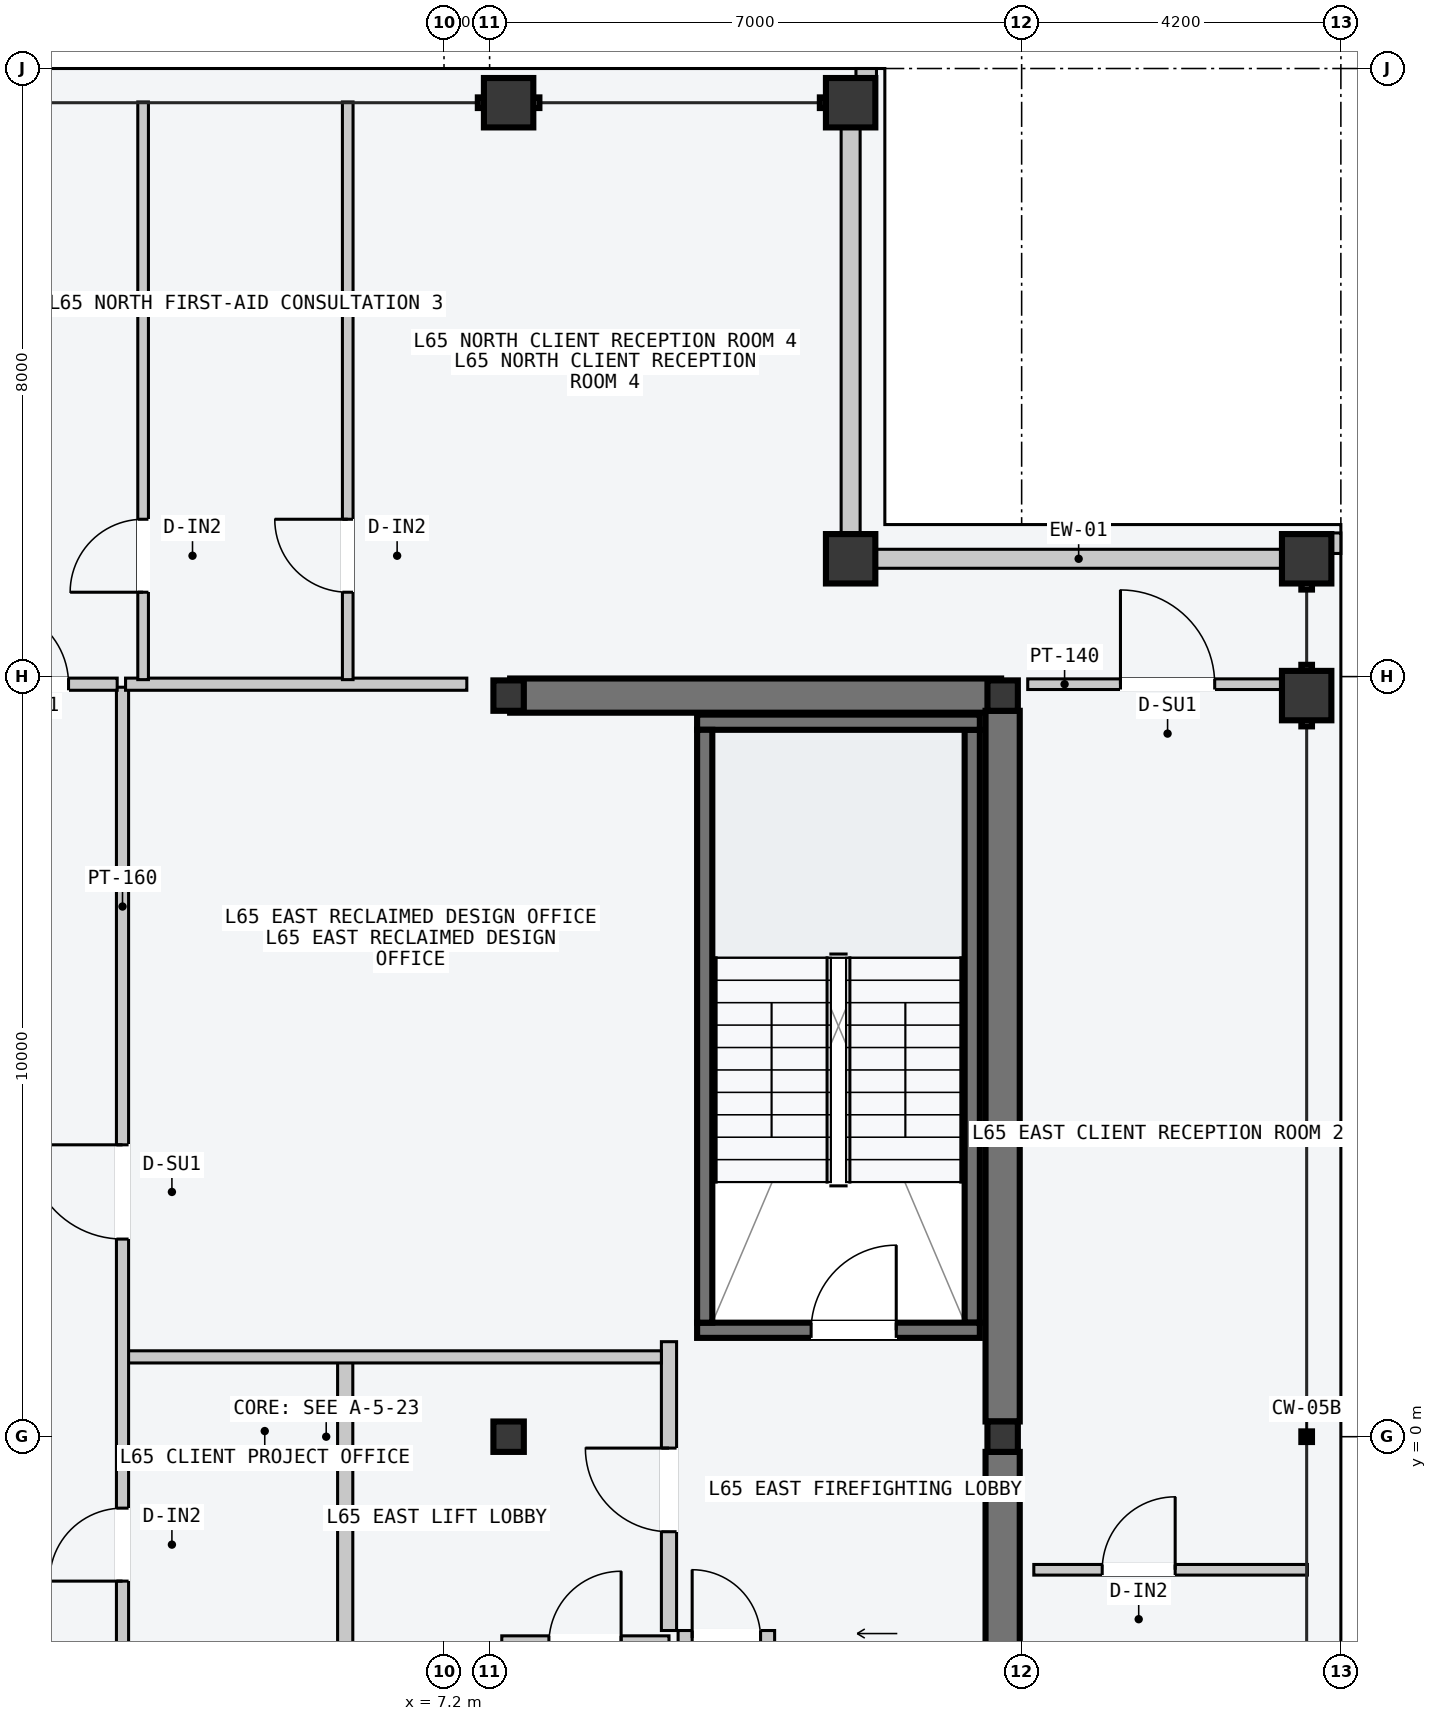
"""IFC4 building model, lengths in metres.
Left out: names, types, materials, properties, quantities, classifications, styles, units other than length and angle.
Written with IfcOpenShell. Run it as: python <this file> out.ifc"""

import sys

from ifc_helpers import new_model, si_unit, direction, frame, frame_2d, origin, origin_2d, place, context, subcontext, project, spatial, rectangle, hollow_rectangle, i_section, extrude, element, fill, save


model = new_model("IFC4")
c1 = context("Model", 3, precision=1e-05, world=origin(), true_north=direction((0.0, 1.0)))
c2 = subcontext(c1, "Body", "Model", "MODEL_VIEW")
j1 = project(units=[si_unit("LENGTHUNIT", "METRE"), si_unit("PLANEANGLEUNIT", "RADIAN")], contexts=[c1])
p1 = place(None, origin())
s1 = spatial("IfcSite", under=j1, at=p1, CompositionType="ELEMENT")
p2 = place(p1, origin())
s2 = spatial("IfcBuilding", under=s1, at=p2, CompositionType="ELEMENT")
p3 = place(p2, frame((0.0, 0.0, 247.2)))
s3 = spatial("IfcBuildingStorey", under=s2, at=p3, CompositionType="ELEMENT", Elevation=247.2)
p4 = place(p3, frame((8.07, 9.75, -0.2), z_axis=(0.0, 0.0, 1.0), x_axis=(1.0, 0.0, 0.0)))
e1 = element("IfcWall", 1, at=p4, inside=s3, PredefinedType="SHEAR", context=c2, shape_type="SweptSolid", body=[
    extrude(rectangle(XDim=6.46, YDim=0.45, at=frame_2d((3.23, 0.0))), origin(), (0.0, 0.0, 1.0), 3.6),
])
for number, where, z_axis, x_axis in (
    (2, (14.55, -9.55, -0.2), (0.0, 0.0, 1.0), (0.0, 1.0, 0.0)),
    (3, (14.55, 0.2, -0.2), (0.0, 0.0, 1.0), (0.0, 1.0, 0.0)),
):
    element("IfcWall", number, at=place(p3, frame(where, z_axis=z_axis, x_axis=x_axis)), inside=s3, PredefinedType="SHEAR", context=c2, shape_type="SweptSolid", body=[
        extrude(rectangle(XDim=9.35, YDim=0.45, at=frame_2d((4.675, 0.0))), origin(), (0.0, 0.0, 1.0), 3.6),
    ])
p5 = place(p3, frame((14.15, 1.5, -0.2), z_axis=(0.0, 0.0, 1.0), x_axis=(0.0, 1.0, 0.0)))
e4 = element("IfcWall", 4, at=p5, inside=s3, PredefinedType="SOLIDWALL", context=c2, shape_type="SweptSolid", body=[
    extrude(rectangle(XDim=7.8, YDim=0.2, at=frame_2d((3.9, 0.0))), origin(), (0.0, 0.0, 1.0), 3.6),
])
p6 = place(p3, frame((10.53, 1.4, -0.2), z_axis=(0.0, 0.0, 1.0), x_axis=(1.0, 0.0, 0.0)))
e5 = element("IfcWall", 5, at=p6, inside=s3, PredefinedType="SOLIDWALL", context=c2, shape_type="SweptSolid", body=[
    extrude(rectangle(XDim=3.72, YDim=0.2, at=frame_2d((1.86, 0.0))), origin(), (0.0, 0.0, 1.0), 3.6),
])
p7 = place(p6, frame((1.5, 0.0, 0.2)))
e6 = element("IfcOpeningElement", 6, at=p7, cuts=e5, PredefinedType="OPENING", context=c2, shape_type="SweptSolid", body=[
    extrude(rectangle(XDim=1.12, YDim=2.18, at=frame_2d((0.56, 1.09))), frame((0.0, 0.11, 0.0), z_axis=(0.0, -1.0, 0.0), x_axis=(1.0, 0.0, 0.0)), (0.0, 0.0, 1.0), 0.22),
])
p8 = place(p3, frame((10.53, 9.4, -0.2), z_axis=(0.0, 0.0, 1.0), x_axis=(1.0, 0.0, 0.0)))
e7 = element("IfcWall", 7, at=p8, inside=s3, PredefinedType="SOLIDWALL", context=c2, shape_type="SweptSolid", body=[
    extrude(rectangle(XDim=3.72, YDim=0.2, at=frame_2d((1.86, 0.0))), origin(), (0.0, 0.0, 1.0), 3.6),
])
p9 = place(p3, frame((10.63, 1.5, -0.2), z_axis=(0.0, 0.0, 1.0), x_axis=(0.0, 1.0, 0.0)))
e8 = element("IfcWall", 8, at=p9, inside=s3, PredefinedType="SOLIDWALL", context=c2, shape_type="SweptSolid", body=[
    extrude(rectangle(XDim=7.8, YDim=0.2, at=frame_2d((3.9, 0.0))), origin(), (0.0, 0.0, 1.0), 3.6),
])
for number, where, z_axis, x_axis in (
    (9, (8.05, 0.0, 0.0), (0.0, 0.0, 1.0), (1.0, 0.0, 0.0)),
    (10, (8.05, 9.75, 0.0), (0.0, 0.0, 1.0), (1.0, 0.0, 0.0)),
    (11, (14.55, 0.0, 0.0), (0.0, 0.0, 1.0), (1.0, 0.0, 0.0)),
    (12, (14.55, 9.75, 0.0), (0.0, 0.0, 1.0), (1.0, 0.0, 0.0)),
):
    element("IfcColumn", number, at=place(p3, frame(where, z_axis=z_axis, x_axis=x_axis)), inside=s3, PredefinedType="COLUMN", context=c2, shape_type="SweptSolid", body=[
        extrude(i_section(OverallWidth=0.4, OverallDepth=0.4, WebThickness=0.013, FlangeThickness=0.021, at=origin_2d()), origin(), (0.0, 0.0, 1.0), 3.6),
    ])
for number, where, z_axis, x_axis in (
    (13, (8.05, 17.55, 0.0), (0.0, 0.0, 1.0), (1.0, 0.0, 0.0)),
    (14, (12.55, 17.55, 0.0), (0.0, 0.0, 1.0), (1.0, 0.0, 0.0)),
    (15, (18.55, 9.75, 0.0), (0.0, 0.0, 1.0), (0.0, 1.0, 0.0)),
    (16, (18.55, 11.55, 0.0), (0.0, 0.0, 1.0), (0.0, 1.0, 0.0)),
    (17, (12.55, 11.55, 0.0), (0.0, 0.0, 1.0), (1.0, 0.0, 0.0)),
):
    element("IfcColumn", number, at=place(p3, frame(where, z_axis=z_axis, x_axis=x_axis)), inside=s3, PredefinedType="COLUMN", context=c2, shape_type="SweptSolid", body=[
        extrude(hollow_rectangle(XDim=0.65, YDim=0.65, WallThickness=0.028, at=origin_2d()), origin(), (0.0, 0.0, 1.0), 3.6),
    ])
for number, where, z_axis, x_axis in (
    (18, (12.885, 11.55, 0.0), (0.0, 0.0, 1.0), (1.0, 0.0, 0.0)),
    (19, (12.55, 11.885, 0.0), (0.0, 0.0, 1.0), (0.0, 1.0, 0.0)),
):
    element("IfcWall", number, at=place(p3, frame(where, z_axis=z_axis, x_axis=x_axis)), inside=s3, PredefinedType="STANDARD", context=c2, shape_type="SweptSolid", body=[
        extrude(rectangle(XDim=5.33, YDim=0.25, at=frame_2d((2.665, 0.0))), origin(), (0.0, 0.0, 1.0), 2.85),
    ])
for number, where, z_axis, x_axis in (
    (20, (12.62, 17.89, 0.0), (0.0, 0.0, 1.0), (1.0, 0.0, 0.0)),
    (21, (18.89, 11.62, 0.0), (0.0, 0.0, 1.0), (0.0, 1.0, 0.0)),
):
    element("IfcWall", number, at=place(p3, frame(where, z_axis=z_axis, x_axis=x_axis)), inside=s3, PredefinedType="PARAPET", context=c2, shape_type="SweptSolid", body=[
        extrude(rectangle(XDim=0.27, YDim=0.22, at=frame_2d((0.135, 0.0))), origin(), (0.0, 0.0, 1.0), 1.2),
    ])
p10 = place(p3, frame((5.9, -9.45, 0.0), z_axis=(0.0, 0.0, 1.0), x_axis=(0.0, 1.0, 0.0)))
e22 = element("IfcWall", 22, at=p10, inside=s3, PredefinedType="PARTITIONING", context=c2, shape_type="SweptSolid", body=[
    extrude(rectangle(XDim=10.5, YDim=0.2, at=frame_2d((5.25, 0.0))), origin(), (0.0, 0.0, 1.0), 3.4),
])
p11 = place(p10, frame((3.9, 0.0, 0.0)))
e23 = element("IfcOpeningElement", 23, at=p11, cuts=e22, PredefinedType="OPENING", context=c2, shape_type="SweptSolid", body=[
    extrude(rectangle(XDim=1.5, YDim=2.2, at=frame_2d((0.75, 1.1))), frame((0.0, 0.11, 0.0), z_axis=(0.0, -1.0, 0.0), x_axis=(1.0, 0.0, 0.0)), (0.0, 0.0, 1.0), 0.22),
])
p12 = place(p3, frame((10.16, -2.55, 0.0), z_axis=(0.0, 0.0, 1.0), x_axis=(0.0, 1.0, 0.0)))
e24 = element("IfcWall", 24, at=p12, inside=s3, PredefinedType="PARTITIONING", context=c2, shape_type="SweptSolid", body=[
    extrude(rectangle(XDim=3.8, YDim=0.2, at=frame_2d((1.9, 0.0))), origin(), (0.0, 0.0, 1.0), 3.4),
])
p13 = place(p12, frame((1.3, 0.0, 0.0)))
e25 = element("IfcOpeningElement", 25, at=p13, cuts=e24, PredefinedType="OPENING", context=c2, shape_type="SweptSolid", body=[
    extrude(rectangle(XDim=1.1, YDim=2.15, at=frame_2d((0.55, 1.075))), frame((0.0, 0.11, 0.0), z_axis=(0.0, -1.0, 0.0), x_axis=(1.0, 0.0, 0.0)), (0.0, 0.0, 1.0), 0.22),
])
p14 = place(p3, frame((10.28, -2.65, 0.0), z_axis=(0.0, 0.0, 1.0), x_axis=(1.0, 0.0, 0.0)))
e26 = element("IfcWall", 26, at=p14, inside=s3, PredefinedType="PARTITIONING", context=c2, shape_type="SweptSolid", body=[
    extrude(rectangle(XDim=1.27, YDim=0.2, at=frame_2d((0.635, 0.0))), origin(), (0.0, 0.0, 1.0), 3.4),
])
p15 = place(p14, frame((0.185, 0.0, 0.0)))
e27 = element("IfcOpeningElement", 27, at=p15, cuts=e26, PredefinedType="OPENING", context=c2, shape_type="SweptSolid", body=[
    extrude(rectangle(XDim=0.9, YDim=2.15, at=frame_2d((0.45, 1.075))), frame((0.0, 0.11, 0.0), z_axis=(0.0, -1.0, 0.0), x_axis=(1.0, 0.0, 0.0)), (0.0, 0.0, 1.0), 0.22),
])
p16 = place(p3, frame((7.96, -2.72, 0.0), z_axis=(0.0, 0.0, 1.0), x_axis=(1.0, 0.0, 0.0)))
e28 = element("IfcWall", 28, at=p16, inside=s3, PredefinedType="PARTITIONING", context=c2, shape_type="SweptSolid", body=[
    extrude(rectangle(XDim=2.2, YDim=0.2, at=frame_2d((1.1, 0.0))), origin(), (0.0, 0.0, 1.0), 3.4),
])
p17 = place(p16, frame((0.62, 0.0, 0.0)))
e29 = element("IfcOpeningElement", 29, at=p17, cuts=e28, PredefinedType="OPENING", context=c2, shape_type="SweptSolid", body=[
    extrude(rectangle(XDim=0.95, YDim=2.1, at=frame_2d((0.475, 1.05))), frame((0.0, 0.11, 0.0), z_axis=(0.0, -1.0, 0.0), x_axis=(1.0, 0.0, 0.0)), (0.0, 0.0, 1.0), 0.22),
])
p18 = place(p3, frame((3.01, 1.05, 0.0), z_axis=(0.0, 0.0, 1.0), x_axis=(1.0, 0.0, 0.0)))
e30 = element("IfcWall", 30, at=p18, inside=s3, PredefinedType="PARTITIONING", context=c2, shape_type="SweptSolid", body=[
    extrude(rectangle(XDim=7.05, YDim=0.16, at=frame_2d((3.525, 0.0))), origin(), (0.0, 0.0, 1.0), 3.4),
])
p19 = place(p3, frame((2.97, -3.5, 0.0), z_axis=(0.0, 0.0, 1.0), x_axis=(0.0, 1.0, 0.0)))
e31 = element("IfcWall", 31, at=p19, inside=s3, PredefinedType="PARTITIONING", context=c2, shape_type="SweptSolid", body=[
    extrude(rectangle(XDim=13.36, YDim=0.16, at=frame_2d((6.68, 0.0))), origin(), (0.0, 0.0, 1.0), 3.4),
])
p20 = place(p19, frame((6.1, 0.0, 0.0)))
e32 = element("IfcOpeningElement", 32, at=p20, cuts=e31, PredefinedType="OPENING", context=c2, shape_type="SweptSolid", body=[
    extrude(rectangle(XDim=1.24, YDim=2.24, at=frame_2d((0.62, 1.12))), frame((0.0, 0.09, 0.0), z_axis=(0.0, -1.0, 0.0), x_axis=(1.0, 0.0, 0.0)), (0.0, 0.0, 1.0), 0.18),
])
p21 = place(p19, frame((1.6, 0.0, 0.0)))
e33 = element("IfcOpeningElement", 33, at=p21, cuts=e31, PredefinedType="OPENING", context=c2, shape_type="SweptSolid", body=[
    extrude(rectangle(XDim=0.96, YDim=2.18, at=frame_2d((0.48, 1.09))), frame((0.0, 0.09, 0.0), z_axis=(0.0, -1.0, 0.0), x_axis=(1.0, 0.0, 0.0)), (0.0, 0.0, 1.0), 0.18),
])
p22 = place(p3, frame((3.01, 9.9, 0.0), z_axis=(0.0, 0.0, 1.0), x_axis=(1.0, 0.0, 0.0)))
e34 = element("IfcWall", 34, at=p22, inside=s3, PredefinedType="PARTITIONING", context=c2, shape_type="SweptSolid", body=[
    extrude(rectangle(XDim=4.49, YDim=0.16, at=frame_2d((2.245, 0.0))), origin(), (0.0, 0.0, 1.0), 3.4),
])
p23 = place(p3, frame((3.241, 9.96, 0.0), z_axis=(0.0, 0.0, 1.0), x_axis=(0.0, 1.0, 0.0)))
e35 = element("IfcWall", 35, at=p23, inside=s3, PredefinedType="PARTITIONING", context=c2, shape_type="SweptSolid", body=[
    extrude(rectangle(XDim=7.6, YDim=0.14, at=frame_2d((3.8, 0.0))), origin(), (0.0, 0.0, 1.0), 3.4),
])
p24 = place(p23, frame((1.15, 0.0, 0.0)))
e36 = element("IfcOpeningElement", 36, at=p24, cuts=e35, PredefinedType="OPENING", context=c2, shape_type="SweptSolid", body=[
    extrude(rectangle(XDim=0.96, YDim=2.18, at=frame_2d((0.48, 1.09))), frame((0.0, 0.08, 0.0), z_axis=(0.0, -1.0, 0.0), x_axis=(1.0, 0.0, 0.0)), (0.0, 0.0, 1.0), 0.16),
])
p25 = place(p3, frame((5.933, 9.96, 0.0), z_axis=(0.0, 0.0, 1.0), x_axis=(0.0, 1.0, 0.0)))
e37 = element("IfcWall", 37, at=p25, inside=s3, PredefinedType="PARTITIONING", context=c2, shape_type="SweptSolid", body=[
    extrude(rectangle(XDim=7.6, YDim=0.14, at=frame_2d((3.8, 0.0))), origin(), (0.0, 0.0, 1.0), 3.4),
])
p26 = place(p25, frame((1.15, 0.0, 0.0)))
e38 = element("IfcOpeningElement", 38, at=p26, cuts=e37, PredefinedType="OPENING", context=c2, shape_type="SweptSolid", body=[
    extrude(rectangle(XDim=0.96, YDim=2.18, at=frame_2d((0.48, 1.09))), frame((0.0, 0.08, 0.0), z_axis=(0.0, -1.0, 0.0), x_axis=(1.0, 0.0, 0.0)), (0.0, 0.0, 1.0), 0.16),
])
p27 = place(p3, frame((0.6, 9.9, 0.0), z_axis=(0.0, 0.0, 1.0), x_axis=(1.0, 0.0, 0.0)))
e39 = element("IfcWall", 39, at=p27, inside=s3, PredefinedType="PARTITIONING", context=c2, shape_type="SweptSolid", body=[
    extrude(rectangle(XDim=2.3, YDim=0.16, at=frame_2d((1.15, 0.0))), origin(), (0.0, 0.0, 1.0), 3.4),
])
p28 = place(p27, frame((0.64, 0.0, 0.0)))
e40 = element("IfcOpeningElement", 40, at=p28, cuts=e39, PredefinedType="OPENING", context=c2, shape_type="SweptSolid", body=[
    extrude(rectangle(XDim=1.02, YDim=2.2, at=frame_2d((0.51, 1.1))), frame((0.0, 0.09, 0.0), z_axis=(0.0, -1.0, 0.0), x_axis=(1.0, 0.0, 0.0)), (0.0, 0.0, 1.0), 0.18),
])
p29 = place(p3, frame((14.88, 9.9, 0.0), z_axis=(0.0, 0.0, 1.0), x_axis=(1.0, 0.0, 0.0)))
e41 = element("IfcWall", 41, at=p29, inside=s3, PredefinedType="PARTITIONING", context=c2, shape_type="SweptSolid", body=[
    extrude(rectangle(XDim=3.68, YDim=0.14, at=frame_2d((1.84, 0.0))), origin(), (0.0, 0.0, 1.0), 3.4),
])
p30 = place(p29, frame((1.22, 0.0, 0.0)))
e42 = element("IfcOpeningElement", 42, at=p30, cuts=e41, PredefinedType="OPENING", context=c2, shape_type="SweptSolid", body=[
    extrude(rectangle(XDim=1.24, YDim=2.24, at=frame_2d((0.62, 1.12))), frame((0.0, 0.08, 0.0), z_axis=(0.0, -1.0, 0.0), x_axis=(1.0, 0.0, 0.0)), (0.0, 0.0, 1.0), 0.16),
])
p31 = place(p3, frame((14.96, -1.751, 0.0), z_axis=(0.0, 0.0, 1.0), x_axis=(1.0, 0.0, 0.0)))
e43 = element("IfcWall", 43, at=p31, inside=s3, PredefinedType="PARTITIONING", context=c2, shape_type="SweptSolid", body=[
    extrude(rectangle(XDim=3.6, YDim=0.14, at=frame_2d((1.8, 0.0))), origin(), (0.0, 0.0, 1.0), 3.4),
])
p32 = place(p31, frame((0.9, 0.0, 0.0)))
e44 = element("IfcOpeningElement", 44, at=p32, cuts=e43, PredefinedType="OPENING", context=c2, shape_type="SweptSolid", body=[
    extrude(rectangle(XDim=0.96, YDim=2.18, at=frame_2d((0.48, 1.09))), frame((0.0, 0.08, 0.0), z_axis=(0.0, -1.0, 0.0), x_axis=(1.0, 0.0, 0.0)), (0.0, 0.0, 1.0), 0.16),
])
p33 = place(p7, origin())
e45 = element("IfcDoor", 45, at=p33, inside=s3, OperationType="SINGLE_SWING_RIGHT", PredefinedType="DOOR", context=c2, shape_type="SweptSolid", body=[
    extrude(rectangle(XDim=1.12, YDim=2.18, at=frame_2d((0.56, 1.09))), frame((0.0, 0.025, 0.0), z_axis=(0.0, -1.0, 0.0), x_axis=(1.0, 0.0, 0.0)), (0.0, 0.0, 1.0), 0.05),
])
fill(e6, e45)
p34 = place(p13, origin())
e46 = element("IfcDoor", 46, at=p34, inside=s3, OperationType="SINGLE_SWING_RIGHT", PredefinedType="DOOR", context=c2, shape_type="SweptSolid", body=[
    extrude(rectangle(XDim=1.1, YDim=2.15, at=frame_2d((0.55, 1.075))), frame((0.0, 0.025, 0.0), z_axis=(0.0, -1.0, 0.0), x_axis=(1.0, 0.0, 0.0)), (0.0, 0.0, 1.0), 0.05),
])
fill(e25, e46)
p35 = place(p15, origin())
e47 = element("IfcDoor", 47, at=p35, inside=s3, OperationType="SINGLE_SWING_LEFT", PredefinedType="DOOR", context=c2, shape_type="SweptSolid", body=[
    extrude(rectangle(XDim=0.9, YDim=2.15, at=frame_2d((0.45, 1.075))), frame((0.0, 0.025, 0.0), z_axis=(0.0, -1.0, 0.0), x_axis=(1.0, 0.0, 0.0)), (0.0, 0.0, 1.0), 0.05),
])
fill(e27, e47)
p36 = place(p20, origin())
e48 = element("IfcDoor", 48, at=p36, inside=s3, OperationType="SINGLE_SWING_RIGHT", PredefinedType="DOOR", context=c2, shape_type="SweptSolid", body=[
    extrude(rectangle(XDim=1.24, YDim=2.24, at=frame_2d((0.62, 1.12))), frame((0.0, 0.025, 0.0), z_axis=(0.0, -1.0, 0.0), x_axis=(1.0, 0.0, 0.0)), (0.0, 0.0, 1.0), 0.05),
])
fill(e32, e48)
p37 = place(p21, origin())
e49 = element("IfcDoor", 49, at=p37, inside=s3, OperationType="SINGLE_SWING_LEFT", PredefinedType="DOOR", context=c2, shape_type="SweptSolid", body=[
    extrude(rectangle(XDim=0.96, YDim=2.18, at=frame_2d((0.48, 1.09))), frame((0.0, 0.025, 0.0), z_axis=(0.0, -1.0, 0.0), x_axis=(1.0, 0.0, 0.0)), (0.0, 0.0, 1.0), 0.05),
])
fill(e33, e49)
p38 = place(p24, origin())
e50 = element("IfcDoor", 50, at=p38, inside=s3, OperationType="SINGLE_SWING_LEFT", PredefinedType="DOOR", context=c2, shape_type="SweptSolid", body=[
    extrude(rectangle(XDim=0.96, YDim=2.18, at=frame_2d((0.48, 1.09))), frame((0.0, 0.025, 0.0), z_axis=(0.0, -1.0, 0.0), x_axis=(1.0, 0.0, 0.0)), (0.0, 0.0, 1.0), 0.05),
])
fill(e36, e50)
p39 = place(p26, origin())
e51 = element("IfcDoor", 51, at=p39, inside=s3, OperationType="SINGLE_SWING_RIGHT", PredefinedType="DOOR", context=c2, shape_type="SweptSolid", body=[
    extrude(rectangle(XDim=0.96, YDim=2.18, at=frame_2d((0.48, 1.09))), frame((0.0, 0.025, 0.0), z_axis=(0.0, -1.0, 0.0), x_axis=(1.0, 0.0, 0.0)), (0.0, 0.0, 1.0), 0.05),
])
fill(e38, e51)
p40 = place(p28, origin())
e52 = element("IfcDoor", 52, at=p40, inside=s3, OperationType="SINGLE_SWING_LEFT", PredefinedType="DOOR", context=c2, shape_type="SweptSolid", body=[
    extrude(rectangle(XDim=1.02, YDim=2.2, at=frame_2d((0.51, 1.1))), frame((0.0, 0.025, 0.0), z_axis=(0.0, -1.0, 0.0), x_axis=(1.0, 0.0, 0.0)), (0.0, 0.0, 1.0), 0.05),
])
fill(e40, e52)
p41 = place(p30, origin())
e53 = element("IfcDoor", 53, at=p41, inside=s3, OperationType="SINGLE_SWING_LEFT", PredefinedType="DOOR", context=c2, shape_type="SweptSolid", body=[
    extrude(rectangle(XDim=1.24, YDim=2.24, at=frame_2d((0.62, 1.12))), frame((0.0, 0.025, 0.0), z_axis=(0.0, -1.0, 0.0), x_axis=(1.0, 0.0, 0.0)), (0.0, 0.0, 1.0), 0.05),
])
fill(e42, e53)
p42 = place(p32, origin())
e54 = element("IfcDoor", 54, at=p42, inside=s3, OperationType="SINGLE_SWING_RIGHT", PredefinedType="DOOR", context=c2, shape_type="SweptSolid", body=[
    extrude(rectangle(XDim=0.96, YDim=2.18, at=frame_2d((0.48, 1.09))), frame((0.0, 0.025, 0.0), z_axis=(0.0, -1.0, 0.0), x_axis=(1.0, 0.0, 0.0)), (0.0, 0.0, 1.0), 0.05),
])
fill(e44, e54)
save(model, sys.argv[1])
